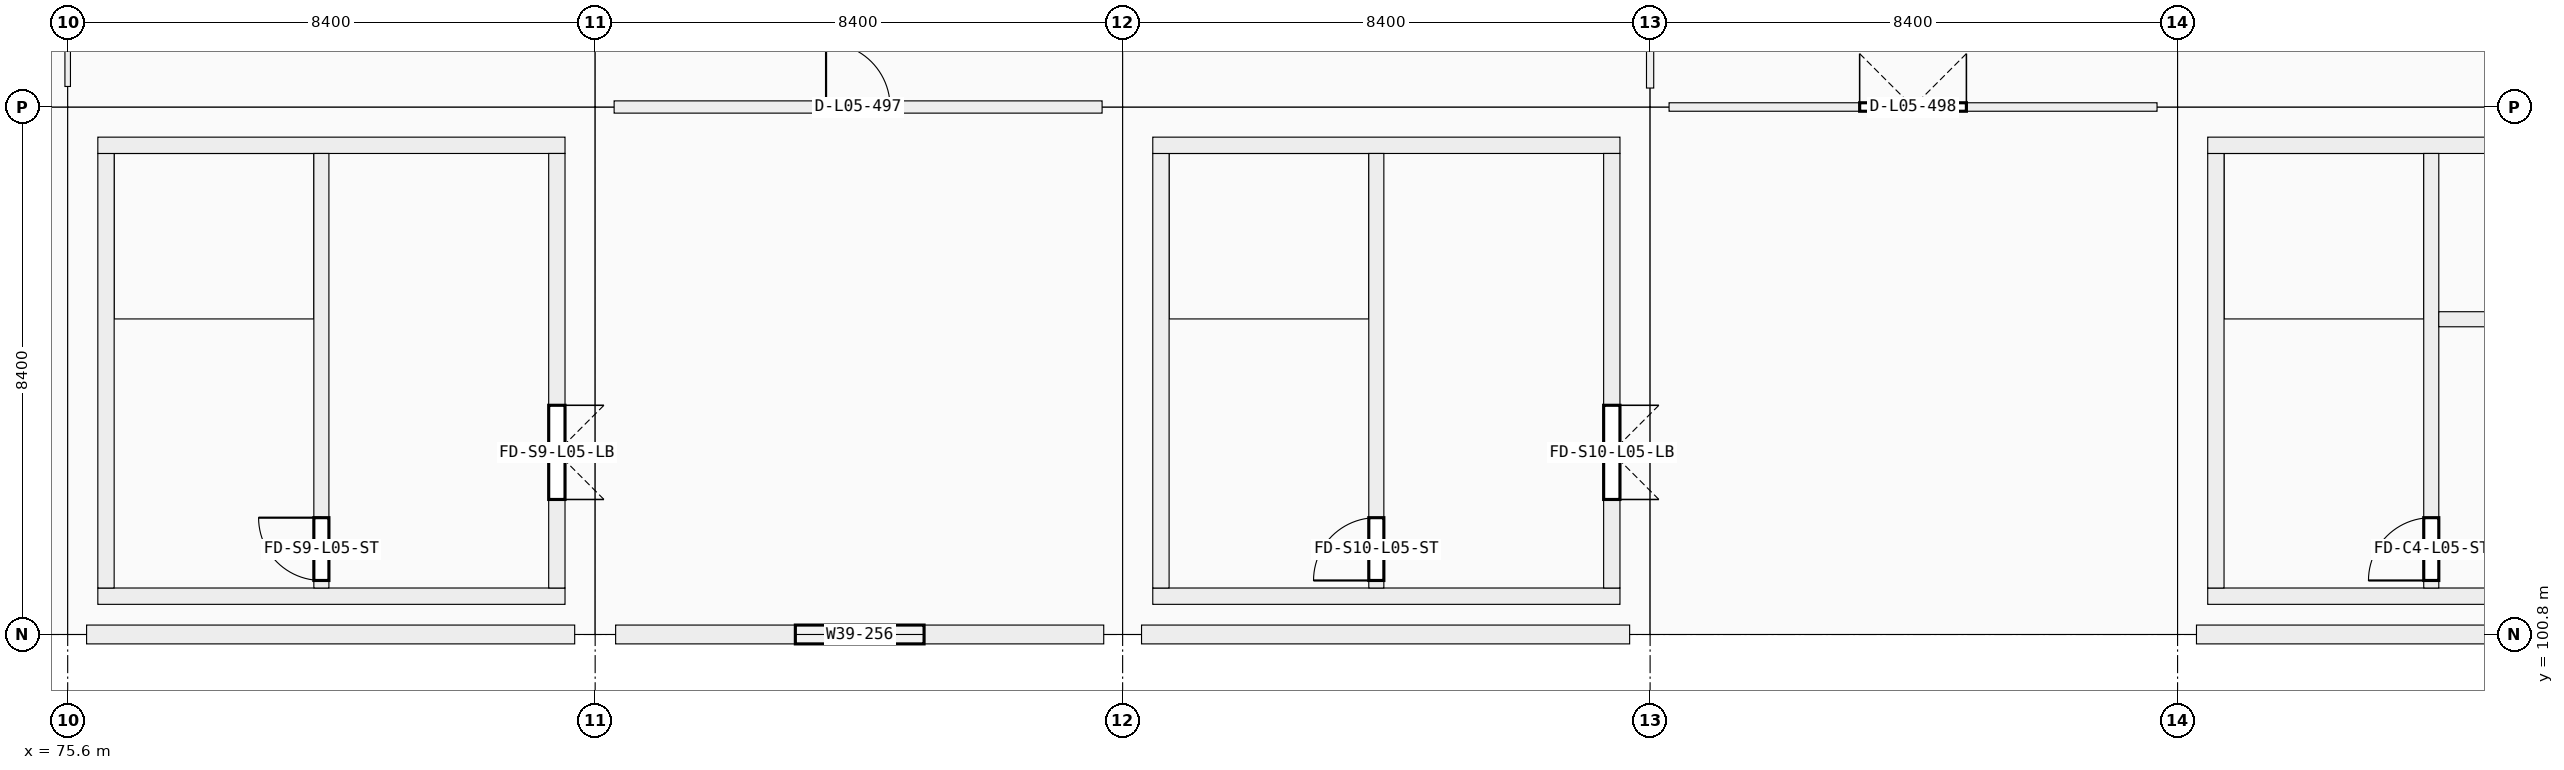
"""IFC4 building model, lengths in metres.
Left out: names, types, materials, properties, quantities, classifications, styles, units other than length and angle.
Written with IfcOpenShell. Run it as: python <this file> out.ifc"""

import sys

from ifc_helpers import new_model, si_unit, direction, frame, frame_2d, origin, origin_2d, place, context, subcontext, project, spatial, rectangle, extrude, element, fill, save


model = new_model("IFC4")
c1 = context("Model", 3, precision=1e-05, world=origin(), true_north=direction((0.0, 1.0)))
c2 = subcontext(c1, "Body", "Model", "MODEL_VIEW")
j1 = project(units=[si_unit("LENGTHUNIT", "METRE"), si_unit("PLANEANGLEUNIT", "RADIAN")], contexts=[c1])
p1 = place(None, origin())
s1 = spatial("IfcSite", under=j1, at=p1, CompositionType="ELEMENT")
p2 = place(p1, origin())
s2 = spatial("IfcBuilding", under=s1, at=p2, CompositionType="ELEMENT")
p3 = place(p2, frame((0.0, 0.0, 23.4)))
s3 = spatial("IfcBuildingStorey", under=s2, at=p3, CompositionType="ELEMENT", Elevation=23.4)
p4 = place(p3, frame((75.6, 100.8, 0.0), z_axis=(0.0, 0.0, 1.0), x_axis=(1.0, 0.0, 0.0)))
e1 = element("IfcColumn", 1, at=p4, inside=s3, PredefinedType="COLUMN", context=c2, shape_type="SweptSolid", body=[
    extrude(rectangle(XDim=0.6, YDim=0.6, at=origin_2d()), origin(), (0.0, 0.0, 1.0), 4.32),
])
for number, where, z_axis, x_axis in (
    (2, (75.6, 109.2, 0.0), (0.0, 0.0, 1.0), (1.0, 0.0, 0.0)),
    (3, (84.0, 100.8, 0.0), (0.0, 0.0, 1.0), (1.0, 0.0, 0.0)),
):
    element("IfcColumn", number, at=place(p3, frame(where, z_axis=z_axis, x_axis=x_axis)), inside=s3, PredefinedType="COLUMN", context=c2, shape_type="SweptSolid", body=[
        extrude(rectangle(XDim=0.65, YDim=0.65, at=origin_2d()), origin(), (0.0, 0.0, 1.0), 4.32),
    ])
for number, where, z_axis, x_axis in (
    (4, (84.0, 109.2, 0.0), (0.0, 0.0, 1.0), (1.0, 0.0, 0.0)),
    (5, (92.4, 100.8, 0.0), (0.0, 0.0, 1.0), (1.0, 0.0, 0.0)),
):
    element("IfcColumn", number, at=place(p3, frame(where, z_axis=z_axis, x_axis=x_axis)), inside=s3, PredefinedType="COLUMN", context=c2, shape_type="SweptSolid", body=[
        extrude(rectangle(XDim=0.6, YDim=0.6, at=origin_2d()), origin(), (0.0, 0.0, 1.0), 4.32),
    ])
for number, where, z_axis, x_axis in (
    (6, (92.4, 109.2, 0.0), (0.0, 0.0, 1.0), (1.0, 0.0, 0.0)),
    (7, (100.8, 100.8, 0.0), (0.0, 0.0, 1.0), (1.0, 0.0, 0.0)),
):
    element("IfcColumn", number, at=place(p3, frame(where, z_axis=z_axis, x_axis=x_axis)), inside=s3, PredefinedType="COLUMN", context=c2, shape_type="SweptSolid", body=[
        extrude(rectangle(XDim=0.65, YDim=0.65, at=origin_2d()), origin(), (0.0, 0.0, 1.0), 4.32),
    ])
for number, where, z_axis, x_axis in (
    (8, (100.8, 109.2, 0.0), (0.0, 0.0, 1.0), (1.0, 0.0, 0.0)),
    (9, (109.2, 100.8, 0.0), (0.0, 0.0, 1.0), (1.0, 0.0, 0.0)),
):
    element("IfcColumn", number, at=place(p3, frame(where, z_axis=z_axis, x_axis=x_axis)), inside=s3, PredefinedType="COLUMN", context=c2, shape_type="SweptSolid", body=[
        extrude(rectangle(XDim=0.6, YDim=0.6, at=origin_2d()), origin(), (0.0, 0.0, 1.0), 4.32),
    ])
p5 = place(p3, frame((109.2, 109.2, 0.0), z_axis=(0.0, 0.0, 1.0), x_axis=(1.0, 0.0, 0.0)))
e10 = element("IfcColumn", 10, at=p5, inside=s3, PredefinedType="COLUMN", context=c2, shape_type="SweptSolid", body=[
    extrude(rectangle(XDim=0.65, YDim=0.65, at=origin_2d()), origin(), (0.0, 0.0, 1.0), 4.32),
])
p6 = place(p3, frame((83.674, 100.8, 0.0), z_axis=(0.0, 0.0, 1.0), x_axis=(-1.0, 0.0, 0.0)))
e11 = element("IfcWall", 11, at=p6, inside=s3, PredefinedType="SOLIDWALL", context=c2, shape_type="SweptSolid", body=[
    extrude(rectangle(XDim=7.773, YDim=0.3, at=frame_2d((3.887, 0.0))), origin(), (0.0, 0.0, 1.0), 3.37),
])
p7 = place(p3, frame((92.099, 100.8, 0.0), z_axis=(0.0, 0.0, 1.0), x_axis=(-1.0, 0.0, 0.0)))
e12 = element("IfcWall", 12, at=p7, inside=s3, PredefinedType="SOLIDWALL", context=c2, shape_type="SweptSolid", body=[
    extrude(rectangle(XDim=7.773, YDim=0.3, at=frame_2d((3.887, 0.0))), origin(), (0.0, 0.0, 1.0), 3.37),
])
p8 = place(p7, frame((2.861, 0.0, 0.9)))
e13 = element("IfcOpeningElement", 13, at=p8, cuts=e12, PredefinedType="OPENING", context=c2, shape_type="SweptSolid", body=[
    extrude(rectangle(XDim=2.05, YDim=1.45, at=frame_2d((1.025, 0.725))), frame((0.0, 0.15, 0.0), z_axis=(0.0, -1.0, 0.0), x_axis=(1.0, 0.0, 0.0)), (0.0, 0.0, 1.0), 0.3),
])
p9 = place(p3, frame((100.474, 100.8, 0.0), z_axis=(0.0, 0.0, 1.0), x_axis=(-1.0, 0.0, 0.0)))
e14 = element("IfcWall", 14, at=p9, inside=s3, PredefinedType="SOLIDWALL", context=c2, shape_type="SweptSolid", body=[
    extrude(rectangle(XDim=7.773, YDim=0.3, at=frame_2d((3.887, 0.0))), origin(), (0.0, 0.0, 1.0), 3.37),
])
p10 = place(p3, frame((117.274, 100.8, 0.0), z_axis=(0.0, 0.0, 1.0), x_axis=(-1.0, 0.0, 0.0)))
e15 = element("IfcWall", 15, at=p10, inside=s3, PredefinedType="SOLIDWALL", context=c2, shape_type="SweptSolid", body=[
    extrude(rectangle(XDim=7.773, YDim=0.3, at=frame_2d((3.886, 0.0))), origin(), (0.0, 0.0, 1.0), 3.37),
])
p11 = place(p3, frame((117.12, 101.41, 0.0), z_axis=(0.0, 0.0, 1.0), x_axis=(-1.0, 0.0, 0.0)))
e16 = element("IfcWall", 16, at=p11, inside=s3, PredefinedType="SHEAR", context=c2, shape_type="SweptSolid", body=[
    extrude(rectangle(XDim=7.44, YDim=0.26, at=frame_2d((3.72, 0.0))), origin(), (0.0, 0.0, 1.0), 4.32),
])
p12 = place(p3, frame((109.81, 101.54, 0.0), z_axis=(0.0, 0.0, 1.0), x_axis=(0.0, 1.0, 0.0)))
e17 = element("IfcWall", 17, at=p12, inside=s3, PredefinedType="SHEAR", context=c2, shape_type="SweptSolid", body=[
    extrude(rectangle(XDim=6.92, YDim=0.26, at=frame_2d((3.46, 0.0))), origin(), (0.0, 0.0, 1.0), 4.32),
])
p13 = place(p3, frame((109.68, 108.59, 0.0), z_axis=(0.0, 0.0, 1.0), x_axis=(1.0, 0.0, 0.0)))
e18 = element("IfcWall", 18, at=p13, inside=s3, PredefinedType="SHEAR", context=c2, shape_type="SweptSolid", body=[
    extrude(rectangle(XDim=7.44, YDim=0.26, at=frame_2d((3.72, 0.0))), origin(), (0.0, 0.0, 1.0), 4.32),
])
p14 = place(p3, frame((113.24, 101.54, 0.0), z_axis=(0.0, 0.0, 1.0), x_axis=(0.0, 1.0, 0.0)))
e19 = element("IfcWall", 19, at=p14, inside=s3, PredefinedType="SHEAR", context=c2, shape_type="SweptSolid", body=[
    extrude(rectangle(XDim=6.92, YDim=0.24, at=frame_2d((3.46, 0.0))), origin(), (0.0, 0.0, 1.0), 4.32),
])
p15 = place(p14, frame((0.12, 0.0, 0.0)))
e20 = element("IfcOpeningElement", 20, at=p15, cuts=e19, PredefinedType="OPENING", context=c2, shape_type="SweptSolid", body=[
    extrude(rectangle(XDim=1.0, YDim=2.15, at=frame_2d((0.5, 1.075))), frame((0.0, 0.12, 0.0), z_axis=(0.0, -1.0, 0.0), x_axis=(1.0, 0.0, 0.0)), (0.0, 0.0, 1.0), 0.24),
])
p16 = place(p3, frame((113.36, 105.82, 0.0), z_axis=(0.0, 0.0, 1.0), x_axis=(1.0, 0.0, 0.0)))
e21 = element("IfcWall", 21, at=p16, inside=s3, PredefinedType="SHEAR", context=c2, shape_type="SweptSolid", body=[
    extrude(rectangle(XDim=3.5, YDim=0.24, at=frame_2d((1.75, 0.0))), origin(), (0.0, 0.0, 1.0), 4.32),
])
p17 = place(p16, frame((1.15, 0.0, 0.0)))
e22 = element("IfcOpeningElement", 22, at=p17, cuts=e21, PredefinedType="OPENING", context=c2, shape_type="SweptSolid", body=[
    extrude(rectangle(XDim=1.2, YDim=2.2, at=frame_2d((0.6, 1.1))), frame((0.0, 0.12, 0.0), z_axis=(0.0, -1.0, 0.0), x_axis=(1.0, 0.0, 0.0)), (0.0, 0.0, 1.0), 0.24),
])
p18 = place(p3, frame((83.52, 101.41, 0.0), z_axis=(0.0, 0.0, 1.0), x_axis=(-1.0, 0.0, 0.0)))
e23 = element("IfcWall", 23, at=p18, inside=s3, PredefinedType="SHEAR", context=c2, shape_type="SweptSolid", body=[
    extrude(rectangle(XDim=7.44, YDim=0.26, at=frame_2d((3.72, 0.0))), origin(), (0.0, 0.0, 1.0), 4.32),
])
p19 = place(p3, frame((76.21, 101.54, 0.0), z_axis=(0.0, 0.0, 1.0), x_axis=(0.0, 1.0, 0.0)))
e24 = element("IfcWall", 24, at=p19, inside=s3, PredefinedType="SHEAR", context=c2, shape_type="SweptSolid", body=[
    extrude(rectangle(XDim=6.92, YDim=0.26, at=frame_2d((3.46, 0.0))), origin(), (0.0, 0.0, 1.0), 4.32),
])
p20 = place(p3, frame((76.08, 108.59, 0.0), z_axis=(0.0, 0.0, 1.0), x_axis=(1.0, 0.0, 0.0)))
e25 = element("IfcWall", 25, at=p20, inside=s3, PredefinedType="SHEAR", context=c2, shape_type="SweptSolid", body=[
    extrude(rectangle(XDim=7.44, YDim=0.26, at=frame_2d((3.72, 0.0))), origin(), (0.0, 0.0, 1.0), 4.32),
])
p21 = place(p3, frame((83.39, 108.46, 0.0), z_axis=(0.0, 0.0, 1.0), x_axis=(0.0, -1.0, 0.0)))
e26 = element("IfcWall", 26, at=p21, inside=s3, PredefinedType="SHEAR", context=c2, shape_type="SweptSolid", body=[
    extrude(rectangle(XDim=6.92, YDim=0.26, at=frame_2d((3.46, 0.0))), origin(), (0.0, 0.0, 1.0), 4.32),
])
p22 = place(p21, frame((4.01, 0.0, 0.0)))
e27 = element("IfcOpeningElement", 27, at=p22, cuts=e26, PredefinedType="OPENING", context=c2, shape_type="SweptSolid", body=[
    extrude(rectangle(XDim=1.5, YDim=2.15, at=frame_2d((0.75, 1.075))), frame((0.0, 0.13, 0.0), z_axis=(0.0, -1.0, 0.0), x_axis=(1.0, 0.0, 0.0)), (0.0, 0.0, 1.0), 0.26),
])
p23 = place(p3, frame((79.64, 101.54, 0.0), z_axis=(0.0, 0.0, 1.0), x_axis=(0.0, 1.0, 0.0)))
e28 = element("IfcWall", 28, at=p23, inside=s3, PredefinedType="SHEAR", context=c2, shape_type="SweptSolid", body=[
    extrude(rectangle(XDim=6.92, YDim=0.24, at=frame_2d((3.46, 0.0))), origin(), (0.0, 0.0, 1.0), 4.32),
])
p24 = place(p23, frame((0.12, 0.0, 0.0)))
e29 = element("IfcOpeningElement", 29, at=p24, cuts=e28, PredefinedType="OPENING", context=c2, shape_type="SweptSolid", body=[
    extrude(rectangle(XDim=1.0, YDim=2.15, at=frame_2d((0.5, 1.075))), frame((0.0, 0.12, 0.0), z_axis=(0.0, -1.0, 0.0), x_axis=(1.0, 0.0, 0.0)), (0.0, 0.0, 1.0), 0.24),
])
p25 = place(p3, frame((100.32, 101.41, 0.0), z_axis=(0.0, 0.0, 1.0), x_axis=(-1.0, 0.0, 0.0)))
e30 = element("IfcWall", 30, at=p25, inside=s3, PredefinedType="SHEAR", context=c2, shape_type="SweptSolid", body=[
    extrude(rectangle(XDim=7.44, YDim=0.26, at=frame_2d((3.72, 0.0))), origin(), (0.0, 0.0, 1.0), 4.32),
])
p26 = place(p3, frame((93.01, 101.54, 0.0), z_axis=(0.0, 0.0, 1.0), x_axis=(0.0, 1.0, 0.0)))
e31 = element("IfcWall", 31, at=p26, inside=s3, PredefinedType="SHEAR", context=c2, shape_type="SweptSolid", body=[
    extrude(rectangle(XDim=6.92, YDim=0.26, at=frame_2d((3.46, 0.0))), origin(), (0.0, 0.0, 1.0), 4.32),
])
p27 = place(p3, frame((92.88, 108.59, 0.0), z_axis=(0.0, 0.0, 1.0), x_axis=(1.0, 0.0, 0.0)))
e32 = element("IfcWall", 32, at=p27, inside=s3, PredefinedType="SHEAR", context=c2, shape_type="SweptSolid", body=[
    extrude(rectangle(XDim=7.44, YDim=0.26, at=frame_2d((3.72, 0.0))), origin(), (0.0, 0.0, 1.0), 4.32),
])
p28 = place(p3, frame((100.19, 108.46, 0.0), z_axis=(0.0, 0.0, 1.0), x_axis=(0.0, -1.0, 0.0)))
e33 = element("IfcWall", 33, at=p28, inside=s3, PredefinedType="SHEAR", context=c2, shape_type="SweptSolid", body=[
    extrude(rectangle(XDim=6.92, YDim=0.26, at=frame_2d((3.46, 0.0))), origin(), (0.0, 0.0, 1.0), 4.32),
])
p29 = place(p28, frame((4.01, 0.0, 0.0)))
e34 = element("IfcOpeningElement", 34, at=p29, cuts=e33, PredefinedType="OPENING", context=c2, shape_type="SweptSolid", body=[
    extrude(rectangle(XDim=1.5, YDim=2.15, at=frame_2d((0.75, 1.075))), frame((0.0, 0.13, 0.0), z_axis=(0.0, -1.0, 0.0), x_axis=(1.0, 0.0, 0.0)), (0.0, 0.0, 1.0), 0.26),
])
p30 = place(p3, frame((96.44, 101.54, 0.0), z_axis=(0.0, 0.0, 1.0), x_axis=(0.0, 1.0, 0.0)))
e35 = element("IfcWall", 35, at=p30, inside=s3, PredefinedType="SHEAR", context=c2, shape_type="SweptSolid", body=[
    extrude(rectangle(XDim=6.92, YDim=0.24, at=frame_2d((3.46, 0.0))), origin(), (0.0, 0.0, 1.0), 4.32),
])
p31 = place(p30, frame((0.12, 0.0, 0.0)))
e36 = element("IfcOpeningElement", 36, at=p31, cuts=e35, PredefinedType="OPENING", context=c2, shape_type="SweptSolid", body=[
    extrude(rectangle(XDim=1.0, YDim=2.15, at=frame_2d((0.5, 1.075))), frame((0.0, 0.12, 0.0), z_axis=(0.0, -1.0, 0.0), x_axis=(1.0, 0.0, 0.0)), (0.0, 0.0, 1.0), 0.24),
])
p32 = place(p3, frame((84.302, 109.2, 0.0), z_axis=(0.0, 0.0, 1.0), x_axis=(1.0, 0.0, 0.0)))
e37 = element("IfcWall", 37, at=p32, inside=s3, PredefinedType="PARTITIONING", context=c2, shape_type="SweptSolid", body=[
    extrude(rectangle(XDim=7.771, YDim=0.195, at=frame_2d((3.885, 0.0))), origin(), (0.0, 0.0, 1.0), 3.19),
])
p33 = place(p32, frame((3.375, 0.0, 0.0)))
e38 = element("IfcOpeningElement", 38, at=p33, cuts=e37, PredefinedType="OPENING", context=c2, shape_type="SweptSolid", body=[
    extrude(rectangle(XDim=1.02, YDim=2.2, at=frame_2d((0.51, 1.1))), frame((0.0, 0.098, 0.0), z_axis=(0.0, -1.0, 0.0), x_axis=(1.0, 0.0, 0.0)), (0.0, 0.0, 1.0), 0.195),
])
p34 = place(p3, frame((101.102, 109.2, 0.0), z_axis=(0.0, 0.0, 1.0), x_axis=(1.0, 0.0, 0.0)))
e39 = element("IfcWall", 39, at=p34, inside=s3, PredefinedType="PARTITIONING", context=c2, shape_type="SweptSolid", body=[
    extrude(rectangle(XDim=7.771, YDim=0.135, at=frame_2d((3.885, 0.0))), origin(), (0.0, 0.0, 1.0), 3.19),
])
p35 = place(p34, frame((3.035, 0.0, 0.0)))
e40 = element("IfcOpeningElement", 40, at=p35, cuts=e39, PredefinedType="OPENING", context=c2, shape_type="SweptSolid", body=[
    extrude(rectangle(XDim=1.7, YDim=2.35, at=frame_2d((0.85, 1.175))), frame((0.0, 0.067, 0.0), z_axis=(0.0, -1.0, 0.0), x_axis=(1.0, 0.0, 0.0)), (0.0, 0.0, 1.0), 0.135),
])
p36 = place(p3, frame((75.6, 109.527, 0.0), z_axis=(0.0, 0.0, 1.0), x_axis=(0.0, 1.0, 0.0)))
e41 = element("IfcWall", 41, at=p36, inside=s3, PredefinedType="PARTITIONING", context=c2, shape_type="SweptSolid", body=[
    extrude(rectangle(XDim=7.796, YDim=0.088, at=frame_2d((3.898, 0.0))), origin(), (0.0, 0.0, 1.0), 3.19),
])
p37 = place(p3, frame((100.8, 109.502, 0.0), z_axis=(0.0, 0.0, 1.0), x_axis=(0.0, 1.0, 0.0)))
e42 = element("IfcWall", 42, at=p37, inside=s3, PredefinedType="PARTITIONING", context=c2, shape_type="SweptSolid", body=[
    extrude(rectangle(XDim=7.821, YDim=0.115, at=frame_2d((3.911, 0.0))), origin(), (0.0, 0.0, 1.0), 3.19),
])
p38 = place(p37, frame((3.21, 0.0, 0.0)))
e43 = element("IfcOpeningElement", 43, at=p38, cuts=e42, PredefinedType="OPENING", context=c2, shape_type="SweptSolid", body=[
    extrude(rectangle(XDim=1.4, YDim=2.25, at=frame_2d((0.7, 1.125))), frame((0.0, 0.058, 0.0), z_axis=(0.0, -1.0, 0.0), x_axis=(1.0, 0.0, 0.0)), (0.0, 0.0, 1.0), 0.115),
])
p39 = place(p8, origin())
e44 = element("IfcWindow", 44, at=p39, inside=s3, PartitioningType="SINGLE_PANEL", PredefinedType="WINDOW", context=c2, shape_type="SweptSolid", body=[
    extrude(rectangle(XDim=2.05, YDim=1.45, at=frame_2d((1.025, 0.725))), frame((0.0, 0.03, 0.0), z_axis=(0.0, -1.0, 0.0), x_axis=(1.0, 0.0, 0.0)), (0.0, 0.0, 1.0), 0.06),
])
fill(e13, e44)
p40 = place(p15, origin())
e45 = element("IfcDoor", 45, at=p40, inside=s3, OperationType="SINGLE_SWING_LEFT", PredefinedType="DOOR", context=c2, shape_type="SweptSolid", body=[
    extrude(rectangle(XDim=1.0, YDim=2.15, at=frame_2d((0.5, 1.075))), frame((0.0, 0.025, 0.0), z_axis=(0.0, -1.0, 0.0), x_axis=(1.0, 0.0, 0.0)), (0.0, 0.0, 1.0), 0.05),
])
fill(e20, e45)
p41 = place(p24, origin())
e46 = element("IfcDoor", 46, at=p41, inside=s3, OperationType="SINGLE_SWING_RIGHT", PredefinedType="DOOR", context=c2, shape_type="SweptSolid", body=[
    extrude(rectangle(XDim=1.0, YDim=2.15, at=frame_2d((0.5, 1.075))), frame((0.0, 0.025, 0.0), z_axis=(0.0, -1.0, 0.0), x_axis=(1.0, 0.0, 0.0)), (0.0, 0.0, 1.0), 0.05),
])
fill(e29, e46)
p42 = place(p22, origin())
e47 = element("IfcDoor", 47, at=p42, inside=s3, OperationType="DOUBLE_DOOR_SINGLE_SWING", PredefinedType="DOOR", context=c2, shape_type="SweptSolid", body=[
    extrude(rectangle(XDim=1.5, YDim=2.15, at=frame_2d((0.75, 1.075))), frame((0.0, 0.025, 0.0), z_axis=(0.0, -1.0, 0.0), x_axis=(1.0, 0.0, 0.0)), (0.0, 0.0, 1.0), 0.05),
])
fill(e27, e47)
p43 = place(p31, origin())
e48 = element("IfcDoor", 48, at=p43, inside=s3, OperationType="SINGLE_SWING_LEFT", PredefinedType="DOOR", context=c2, shape_type="SweptSolid", body=[
    extrude(rectangle(XDim=1.0, YDim=2.15, at=frame_2d((0.5, 1.075))), frame((0.0, 0.025, 0.0), z_axis=(0.0, -1.0, 0.0), x_axis=(1.0, 0.0, 0.0)), (0.0, 0.0, 1.0), 0.05),
])
fill(e36, e48)
p44 = place(p29, origin())
e49 = element("IfcDoor", 49, at=p44, inside=s3, OperationType="DOUBLE_DOOR_SINGLE_SWING", PredefinedType="DOOR", context=c2, shape_type="SweptSolid", body=[
    extrude(rectangle(XDim=1.5, YDim=2.15, at=frame_2d((0.75, 1.075))), frame((0.0, 0.025, 0.0), z_axis=(0.0, -1.0, 0.0), x_axis=(1.0, 0.0, 0.0)), (0.0, 0.0, 1.0), 0.05),
])
fill(e34, e49)
p45 = place(p33, origin())
e50 = element("IfcDoor", 50, at=p45, inside=s3, OperationType="SINGLE_SWING_LEFT", PredefinedType="DOOR", context=c2, shape_type="SweptSolid", body=[
    extrude(rectangle(XDim=1.02, YDim=2.2, at=frame_2d((0.51, 1.1))), frame((0.0, 0.025, 0.0), z_axis=(0.0, -1.0, 0.0), x_axis=(1.0, 0.0, 0.0)), (0.0, 0.0, 1.0), 0.05),
])
fill(e38, e50)
p46 = place(p35, origin())
e51 = element("IfcDoor", 51, at=p46, inside=s3, OperationType="DOUBLE_DOOR_SINGLE_SWING", PredefinedType="DOOR", context=c2, shape_type="SweptSolid", body=[
    extrude(rectangle(XDim=1.7, YDim=2.35, at=frame_2d((0.85, 1.175))), frame((0.0, 0.025, 0.0), z_axis=(0.0, -1.0, 0.0), x_axis=(1.0, 0.0, 0.0)), (0.0, 0.0, 1.0), 0.05),
])
fill(e40, e51)
save(model, sys.argv[1])
